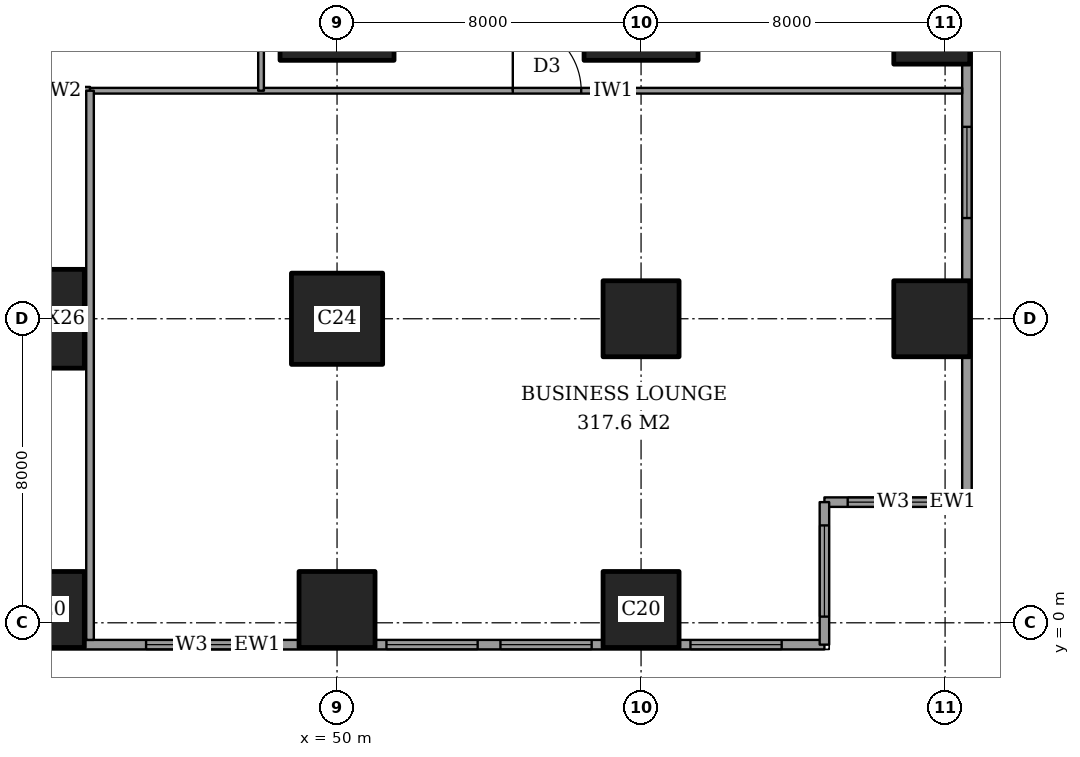
"""IFC4 building model, lengths in metres.
Left out: names, types, materials, properties, quantities, classifications, styles, units other than length and angle.
Written with IfcOpenShell. Run it as: python <this file> out.ifc"""

import sys

from ifc_helpers import new_model, si_unit, direction, frame, frame_2d, origin, origin_2d, place, context, subcontext, project, spatial, rectangle, extrude, element, fill, save


model = new_model("IFC4")
c1 = context("Model", 3, precision=1e-05, world=origin(), true_north=direction((0.0, 1.0)))
c2 = subcontext(c1, "Body", "Model", "MODEL_VIEW")
j1 = project(units=[si_unit("LENGTHUNIT", "METRE"), si_unit("PLANEANGLEUNIT", "RADIAN")], contexts=[c1])
p1 = place(None, origin())
s1 = spatial("IfcSite", under=j1, at=p1, CompositionType="ELEMENT")
p2 = place(p1, origin())
s2 = spatial("IfcBuilding", under=s1, at=p2, CompositionType="ELEMENT")
p3 = place(p2, frame((0.0, 0.0, 21.0)))
s3 = spatial("IfcBuildingStorey", under=s2, at=p3, CompositionType="ELEMENT", Elevation=21.0)
p4 = place(p3, frame((42.35, 0.35, 0.0), z_axis=(0.0, 0.0, 1.0), x_axis=(1.0, 0.0, 0.0)))
e1 = element("IfcColumn", 1, at=p4, inside=s3, PredefinedType="COLUMN", context=c2, shape_type="SweptSolid", body=[
    extrude(rectangle(XDim=2.0, YDim=2.0, at=origin_2d()), origin(), (0.0, 0.0, 1.0), 5.0),
])
p5 = place(p3, frame((42.35, 8.0, 0.0), z_axis=(0.0, 0.0, 1.0), x_axis=(1.0, 0.0, 0.0)))
e2 = element("IfcColumn", 2, at=p5, inside=s3, PredefinedType="COLUMN", context=c2, shape_type="SweptSolid", body=[
    extrude(rectangle(XDim=2.0, YDim=2.6, at=origin_2d()), origin(), (0.0, 0.0, 1.0), 5.0),
])
p6 = place(p3, frame((50.0, 0.35, 0.0), z_axis=(0.0, 0.0, 1.0), x_axis=(1.0, 0.0, 0.0)))
e3 = element("IfcColumn", 3, at=p6, inside=s3, PredefinedType="COLUMN", context=c2, shape_type="SweptSolid", body=[
    extrude(rectangle(XDim=2.0, YDim=2.0, at=origin_2d()), origin(), (0.0, 0.0, 1.0), 5.0),
])
p7 = place(p3, frame((50.0, 8.0, 0.0), z_axis=(0.0, 0.0, 1.0), x_axis=(1.0, 0.0, 0.0)))
e4 = element("IfcColumn", 4, at=p7, inside=s3, PredefinedType="COLUMN", context=c2, shape_type="SweptSolid", body=[
    extrude(rectangle(XDim=2.4, YDim=2.4, at=origin_2d()), origin(), (0.0, 0.0, 1.0), 5.0),
])
p8 = place(p3, frame((50.0, 16.0, 0.0), z_axis=(0.0, 0.0, 1.0), x_axis=(1.0, 0.0, 0.0)))
e5 = element("IfcColumn", 5, at=p8, inside=s3, PredefinedType="COLUMN", context=c2, shape_type="SweptSolid", body=[
    extrude(rectangle(XDim=3.0, YDim=2.4, at=origin_2d()), origin(), (0.0, 0.0, 1.0), 5.0),
])
for number, where, z_axis, x_axis in (
    (6, (58.0, 0.35, 0.0), (0.0, 0.0, 1.0), (1.0, 0.0, 0.0)),
    (7, (58.0, 8.0, 0.0), (0.0, 0.0, 1.0), (1.0, 0.0, 0.0)),
):
    element("IfcColumn", number, at=place(p3, frame(where, z_axis=z_axis, x_axis=x_axis)), inside=s3, PredefinedType="COLUMN", context=c2, shape_type="SweptSolid", body=[
        extrude(rectangle(XDim=2.0, YDim=2.0, at=origin_2d()), origin(), (0.0, 0.0, 1.0), 5.0),
    ])
p9 = place(p3, frame((58.0, 16.0, 0.0), z_axis=(0.0, 0.0, 1.0), x_axis=(1.0, 0.0, 0.0)))
e8 = element("IfcColumn", 8, at=p9, inside=s3, PredefinedType="COLUMN", context=c2, shape_type="SweptSolid", body=[
    extrude(rectangle(XDim=3.0, YDim=2.4, at=origin_2d()), origin(), (0.0, 0.0, 1.0), 5.0),
])
p10 = place(p3, frame((65.65, 8.0, 0.0), z_axis=(0.0, 0.0, 1.0), x_axis=(1.0, 0.0, 0.0)))
e9 = element("IfcColumn", 9, at=p10, inside=s3, PredefinedType="COLUMN", context=c2, shape_type="SweptSolid", body=[
    extrude(rectangle(XDim=2.0, YDim=2.0, at=origin_2d()), origin(), (0.0, 0.0, 1.0), 5.0),
])
p11 = place(p3, frame((65.65, 16.0, 0.0), z_axis=(0.0, 0.0, 1.0), x_axis=(0.0, 1.0, 0.0)))
e10 = element("IfcColumn", 10, at=p11, inside=s3, PredefinedType="COLUMN", context=c2, shape_type="SweptSolid", body=[
    extrude(rectangle(XDim=2.6, YDim=2.0, at=origin_2d()), origin(), (0.0, 0.0, 1.0), 5.0),
])
p12 = place(p3, frame((62.825, 3.175, 0.0), z_axis=(0.0, 0.0, 1.0), x_axis=(1.0, 0.0, 0.0)))
e11 = element("IfcWall", 11, at=p12, inside=s3, PredefinedType="SOLIDWALL", context=c2, shape_type="SweptSolid", body=[
    extrude(rectangle(XDim=3.75, YDim=0.25, at=frame_2d((1.875, 0.0))), origin(), (0.0, 0.0, 1.0), 5.0),
])
p13 = place(p12, frame((0.613, 0.0, 0.6)))
e12 = element("IfcOpeningElement", 12, at=p13, cuts=e11, PredefinedType="OPENING", context=c2, shape_type="SweptSolid", body=[
    extrude(rectangle(XDim=2.4, YDim=3.0, at=frame_2d((1.2, 1.5))), frame((0.0, 0.135, 0.0), z_axis=(0.0, -1.0, 0.0), x_axis=(1.0, 0.0, 0.0)), (0.0, 0.0, 1.0), 0.27),
])
p14 = place(p3, frame((66.575, 3.175, 0.0), z_axis=(0.0, 0.0, 1.0), x_axis=(0.0, 1.0, 0.0)))
e13 = element("IfcWall", 13, at=p14, inside=s3, PredefinedType="SOLIDWALL", context=c2, shape_type="SweptSolid", body=[
    extrude(rectangle(XDim=41.65, YDim=0.25, at=frame_2d((20.825, 0.0))), origin(), (0.0, 0.0, 1.0), 5.0),
])
p15 = place(p14, frame((7.475, 0.0, 0.6)))
e14 = element("IfcOpeningElement", 14, at=p15, cuts=e13, PredefinedType="OPENING", context=c2, shape_type="SweptSolid", body=[
    extrude(rectangle(XDim=2.4, YDim=3.0, at=frame_2d((1.2, 1.5))), frame((0.0, 0.135, 0.0), z_axis=(0.0, -1.0, 0.0), x_axis=(1.0, 0.0, 0.0)), (0.0, 0.0, 1.0), 0.27),
])
p16 = place(p14, frame((15.775, 0.0, 0.6)))
e15 = element("IfcOpeningElement", 15, at=p16, cuts=e13, PredefinedType="OPENING", context=c2, shape_type="SweptSolid", body=[
    extrude(rectangle(XDim=2.4, YDim=3.0, at=frame_2d((1.2, 1.5))), frame((0.0, 0.135, 0.0), z_axis=(0.0, -1.0, 0.0), x_axis=(1.0, 0.0, 0.0)), (0.0, 0.0, 1.0), 0.27),
])
p17 = place(p14, frame((23.475, 0.0, 0.6)))
e16 = element("IfcOpeningElement", 16, at=p17, cuts=e13, PredefinedType="OPENING", context=c2, shape_type="SweptSolid", body=[
    extrude(rectangle(XDim=2.4, YDim=3.0, at=frame_2d((1.2, 1.5))), frame((0.0, 0.135, 0.0), z_axis=(0.0, -1.0, 0.0), x_axis=(1.0, 0.0, 0.0)), (0.0, 0.0, 1.0), 0.27),
])
p18 = place(p14, frame((31.725, 0.0, 0.6)))
e17 = element("IfcOpeningElement", 17, at=p18, cuts=e13, PredefinedType="OPENING", context=c2, shape_type="SweptSolid", body=[
    extrude(rectangle(XDim=2.4, YDim=3.0, at=frame_2d((1.2, 1.5))), frame((0.0, 0.135, 0.0), z_axis=(0.0, -1.0, 0.0), x_axis=(1.0, 0.0, 0.0)), (0.0, 0.0, 1.0), 0.27),
])
p19 = place(p3, frame((62.825, -0.575, 0.0), z_axis=(0.0, 0.0, 1.0), x_axis=(0.0, 1.0, 0.0)))
e18 = element("IfcWall", 18, at=p19, inside=s3, PredefinedType="SOLIDWALL", context=c2, shape_type="SweptSolid", body=[
    extrude(rectangle(XDim=3.75, YDim=0.25, at=frame_2d((1.875, 0.0))), origin(), (0.0, 0.0, 1.0), 5.0),
])
p20 = place(p19, frame((0.738, 0.0, 0.6)))
e19 = element("IfcOpeningElement", 19, at=p20, cuts=e18, PredefinedType="OPENING", context=c2, shape_type="SweptSolid", body=[
    extrude(rectangle(XDim=2.4, YDim=3.0, at=frame_2d((1.2, 1.5))), frame((0.0, 0.135, 0.0), z_axis=(0.0, -1.0, 0.0), x_axis=(1.0, 0.0, 0.0)), (0.0, 0.0, 1.0), 0.27),
])
p21 = place(p3, frame((42.0, 14.0, 0.0), z_axis=(0.0, 0.0, 1.0), x_axis=(1.0, 0.0, 0.0)))
e20 = element("IfcWall", 20, at=p21, inside=s3, PredefinedType="PARTITIONING", context=c2, shape_type="SweptSolid", body=[
    extrude(rectangle(XDim=1.5, YDim=0.2, at=frame_2d((0.75, 0.0))), origin(), (0.0, 0.0, 1.0), 4.65),
])
p22 = place(p3, frame((43.5, 14.0, 0.0), z_axis=(0.0, 0.0, 1.0), x_axis=(1.0, 0.0, 0.0)))
e21 = element("IfcWall", 21, at=p22, inside=s3, PredefinedType="PARTITIONING", context=c2, shape_type="SweptSolid", body=[
    extrude(rectangle(XDim=22.95, YDim=0.15, at=frame_2d((11.475, 0.0))), origin(), (0.0, 0.0, 1.0), 4.65),
])
p23 = place(p22, frame((11.125, 0.0, 0.0)))
e22 = element("IfcOpeningElement", 22, at=p23, cuts=e21, PredefinedType="OPENING", context=c2, shape_type="SweptSolid", body=[
    extrude(rectangle(XDim=1.8, YDim=2.1, at=frame_2d((0.9, 1.05))), frame((0.0, 0.085, 0.0), z_axis=(0.0, -1.0, 0.0), x_axis=(1.0, 0.0, 0.0)), (0.0, 0.0, 1.0), 0.17),
])
p24 = place(p3, frame((43.5, -0.45, 0.0), z_axis=(0.0, 0.0, 1.0), x_axis=(0.0, 1.0, 0.0)))
e23 = element("IfcWall", 23, at=p24, inside=s3, PredefinedType="PARTITIONING", context=c2, shape_type="SweptSolid", body=[
    extrude(rectangle(XDim=14.45, YDim=0.2, at=frame_2d((7.225, 0.0))), origin(), (0.0, 0.0, 1.0), 4.65),
])
p25 = place(p3, frame((48.0, 14.0, 0.0), z_axis=(0.0, 0.0, 1.0), x_axis=(0.0, 1.0, 0.0)))
e24 = element("IfcWall", 24, at=p25, inside=s3, PredefinedType="PARTITIONING", context=c2, shape_type="SweptSolid", body=[
    extrude(rectangle(XDim=14.0, YDim=0.15, at=frame_2d((7.0, 0.0))), origin(), (0.0, 0.0, 1.0), 4.65),
])
p26 = place(p25, frame((10.3, 0.0, 0.0)))
e25 = element("IfcOpeningElement", 25, at=p26, cuts=e24, PredefinedType="OPENING", context=c2, shape_type="SweptSolid", body=[
    extrude(rectangle(XDim=1.8, YDim=2.1, at=frame_2d((0.9, 1.05))), frame((0.0, 0.085, 0.0), z_axis=(0.0, -1.0, 0.0), x_axis=(1.0, 0.0, 0.0)), (0.0, 0.0, 1.0), 0.17),
])
p27 = place(p3, frame((32.983, -0.575, 0.0), z_axis=(0.0, 0.0, 1.0), x_axis=(1.0, 0.0, 0.0)))
e26 = element("IfcWall", 26, at=p27, inside=s3, PredefinedType="SOLIDWALL", context=c2, shape_type="SweptSolid", body=[
    extrude(rectangle(XDim=29.842, YDim=0.25, at=frame_2d((14.921, 0.0))), origin(), (0.0, 0.0, 1.0), 5.0),
])
p28 = place(p27, frame((1.317, 0.0, 0.6)))
e27 = element("IfcOpeningElement", 27, at=p28, cuts=e26, PredefinedType="OPENING", context=c2, shape_type="SweptSolid", body=[
    extrude(rectangle(XDim=2.4, YDim=3.0, at=frame_2d((1.2, 1.5))), frame((0.0, 0.135, 0.0), z_axis=(0.0, -1.0, 0.0), x_axis=(1.0, 0.0, 0.0)), (0.0, 0.0, 1.0), 0.27),
])
p29 = place(p27, frame((5.217, 0.0, 0.6)))
e28 = element("IfcOpeningElement", 28, at=p29, cuts=e26, PredefinedType="OPENING", context=c2, shape_type="SweptSolid", body=[
    extrude(rectangle(XDim=2.4, YDim=3.0, at=frame_2d((1.2, 1.5))), frame((0.0, 0.135, 0.0), z_axis=(0.0, -1.0, 0.0), x_axis=(1.0, 0.0, 0.0)), (0.0, 0.0, 1.0), 0.27),
])
p30 = place(p27, frame((11.992, 0.0, 0.6)))
e29 = element("IfcOpeningElement", 29, at=p30, cuts=e26, PredefinedType="OPENING", context=c2, shape_type="SweptSolid", body=[
    extrude(rectangle(XDim=2.4, YDim=3.0, at=frame_2d((1.2, 1.5))), frame((0.0, 0.135, 0.0), z_axis=(0.0, -1.0, 0.0), x_axis=(1.0, 0.0, 0.0)), (0.0, 0.0, 1.0), 0.27),
])
p31 = place(p27, frame((18.317, 0.0, 0.6)))
e30 = element("IfcOpeningElement", 30, at=p31, cuts=e26, PredefinedType="OPENING", context=c2, shape_type="SweptSolid", body=[
    extrude(rectangle(XDim=2.4, YDim=3.0, at=frame_2d((1.2, 1.5))), frame((0.0, 0.135, 0.0), z_axis=(0.0, -1.0, 0.0), x_axis=(1.0, 0.0, 0.0)), (0.0, 0.0, 1.0), 0.27),
])
p32 = place(p27, frame((21.317, 0.0, 0.6)))
e31 = element("IfcOpeningElement", 31, at=p32, cuts=e26, PredefinedType="OPENING", context=c2, shape_type="SweptSolid", body=[
    extrude(rectangle(XDim=2.4, YDim=3.0, at=frame_2d((1.2, 1.5))), frame((0.0, 0.135, 0.0), z_axis=(0.0, -1.0, 0.0), x_axis=(1.0, 0.0, 0.0)), (0.0, 0.0, 1.0), 0.27),
])
p33 = place(p27, frame((26.317, 0.0, 0.6)))
e32 = element("IfcOpeningElement", 32, at=p33, cuts=e26, PredefinedType="OPENING", context=c2, shape_type="SweptSolid", body=[
    extrude(rectangle(XDim=2.4, YDim=3.0, at=frame_2d((1.2, 1.5))), frame((0.0, 0.135, 0.0), z_axis=(0.0, -1.0, 0.0), x_axis=(1.0, 0.0, 0.0)), (0.0, 0.0, 1.0), 0.27),
])
p34 = place(p13, origin())
e33 = element("IfcWindow", 33, at=p34, inside=s3, PartitioningType="SINGLE_PANEL", PredefinedType="WINDOW", context=c2, shape_type="SweptSolid", body=[
    extrude(rectangle(XDim=2.4, YDim=3.0, at=frame_2d((1.2, 1.5))), frame((0.0, 0.03, 0.0), z_axis=(0.0, -1.0, 0.0), x_axis=(1.0, 0.0, 0.0)), (0.0, 0.0, 1.0), 0.06),
])
fill(e12, e33)
p35 = place(p15, origin())
e34 = element("IfcWindow", 34, at=p35, inside=s3, PartitioningType="SINGLE_PANEL", PredefinedType="WINDOW", context=c2, shape_type="SweptSolid", body=[
    extrude(rectangle(XDim=2.4, YDim=3.0, at=frame_2d((1.2, 1.5))), frame((0.0, 0.03, 0.0), z_axis=(0.0, -1.0, 0.0), x_axis=(1.0, 0.0, 0.0)), (0.0, 0.0, 1.0), 0.06),
])
fill(e14, e34)
p36 = place(p30, origin())
e35 = element("IfcWindow", 35, at=p36, inside=s3, PartitioningType="SINGLE_PANEL", PredefinedType="WINDOW", context=c2, shape_type="SweptSolid", body=[
    extrude(rectangle(XDim=2.4, YDim=3.0, at=frame_2d((1.2, 1.5))), frame((0.0, 0.03, 0.0), z_axis=(0.0, -1.0, 0.0), x_axis=(1.0, 0.0, 0.0)), (0.0, 0.0, 1.0), 0.06),
])
fill(e29, e35)
p37 = place(p31, origin())
e36 = element("IfcWindow", 36, at=p37, inside=s3, PartitioningType="SINGLE_PANEL", PredefinedType="WINDOW", context=c2, shape_type="SweptSolid", body=[
    extrude(rectangle(XDim=2.4, YDim=3.0, at=frame_2d((1.2, 1.5))), frame((0.0, 0.03, 0.0), z_axis=(0.0, -1.0, 0.0), x_axis=(1.0, 0.0, 0.0)), (0.0, 0.0, 1.0), 0.06),
])
fill(e30, e36)
p38 = place(p32, origin())
e37 = element("IfcWindow", 37, at=p38, inside=s3, PartitioningType="SINGLE_PANEL", PredefinedType="WINDOW", context=c2, shape_type="SweptSolid", body=[
    extrude(rectangle(XDim=2.4, YDim=3.0, at=frame_2d((1.2, 1.5))), frame((0.0, 0.03, 0.0), z_axis=(0.0, -1.0, 0.0), x_axis=(1.0, 0.0, 0.0)), (0.0, 0.0, 1.0), 0.06),
])
fill(e31, e37)
p39 = place(p33, origin())
e38 = element("IfcWindow", 38, at=p39, inside=s3, PartitioningType="SINGLE_PANEL", PredefinedType="WINDOW", context=c2, shape_type="SweptSolid", body=[
    extrude(rectangle(XDim=2.4, YDim=3.0, at=frame_2d((1.2, 1.5))), frame((0.0, 0.03, 0.0), z_axis=(0.0, -1.0, 0.0), x_axis=(1.0, 0.0, 0.0)), (0.0, 0.0, 1.0), 0.06),
])
fill(e32, e38)
p40 = place(p20, origin())
e39 = element("IfcWindow", 39, at=p40, inside=s3, PartitioningType="SINGLE_PANEL", PredefinedType="WINDOW", context=c2, shape_type="SweptSolid", body=[
    extrude(rectangle(XDim=2.4, YDim=3.0, at=frame_2d((1.2, 1.5))), frame((0.0, 0.03, 0.0), z_axis=(0.0, -1.0, 0.0), x_axis=(1.0, 0.0, 0.0)), (0.0, 0.0, 1.0), 0.06),
])
fill(e19, e39)
p41 = place(p23, origin())
e40 = element("IfcDoor", 40, at=p41, inside=s3, OperationType="DOUBLE_DOOR_DOUBLE_SWING", PredefinedType="DOOR", context=c2, shape_type="SweptSolid", body=[
    extrude(rectangle(XDim=1.8, YDim=2.1, at=frame_2d((0.9, 1.05))), frame((0.0, 0.025, 0.0), z_axis=(0.0, -1.0, 0.0), x_axis=(1.0, 0.0, 0.0)), (0.0, 0.0, 1.0), 0.05),
])
fill(e22, e40)
save(model, sys.argv[1])
